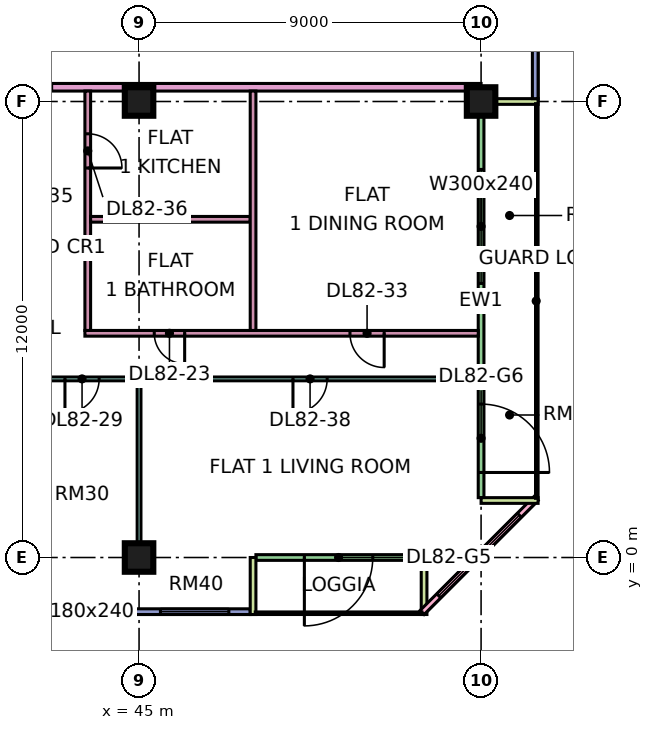
"""IFC4 building model, lengths in metres.
Left out: names, types, materials, properties, quantities, classifications, styles, units other than length and angle.
Written with IfcOpenShell. Run it as: python <this file> out.ifc"""

import sys

from ifc_helpers import new_model, si_unit, direction, frame, frame_2d, origin, origin_2d, place, context, subcontext, project, spatial, rectangle, extrude, element, fill, save


model = new_model("IFC4")
c1 = context("Model", 3, precision=1e-05, world=origin(), true_north=direction((0.0, 1.0)))
c2 = subcontext(c1, "Body", "Model", "MODEL_VIEW")
j1 = project(units=[si_unit("LENGTHUNIT", "METRE"), si_unit("PLANEANGLEUNIT", "RADIAN")], contexts=[c1])
p1 = place(None, origin())
s1 = spatial("IfcSite", under=j1, at=p1, CompositionType="ELEMENT")
p2 = place(p1, origin())
s2 = spatial("IfcBuilding", under=s1, at=p2, CompositionType="ELEMENT")
p3 = place(p2, frame((0.0, 0.0, 353.9)))
s3 = spatial("IfcBuildingStorey", under=s2, at=p3, CompositionType="ELEMENT", Elevation=353.9)
for number, where, z_axis, x_axis in (
    (1, (45.0, 0.0, 0.0), (0.0, 0.0, 1.0), (1.0, 0.0, 0.0)),
    (2, (45.0, 12.0, 0.0), (0.0, 0.0, 1.0), (1.0, 0.0, 0.0)),
    (3, (54.0, 12.0, 0.0), (0.0, 0.0, 1.0), (1.0, 0.0, 0.0)),
):
    element("IfcColumn", number, at=place(p3, frame(where, z_axis=z_axis, x_axis=x_axis)), inside=s3, PredefinedType="COLUMN", context=c2, shape_type="SweptSolid", body=[
        extrude(rectangle(XDim=0.75, YDim=0.75, at=origin_2d()), origin(), (0.0, 0.0, 1.0), 3.75),
    ])
p4 = place(p3, frame((36.075, -1.425, 0.0), z_axis=(0.0, 0.0, 1.0), x_axis=(1.0, 0.0, 0.0)))
e4 = element("IfcWall", 4, at=p4, inside=s3, PredefinedType="SOLIDWALL", context=c2, shape_type="SweptSolid", body=[
    extrude(rectangle(XDim=11.85, YDim=0.15, at=frame_2d((5.925, 0.0))), origin(), (0.0, 0.0, 1.0), 3.35),
])
p5 = place(p4, frame((0.562, 0.0, 0.45)))
e5 = element("IfcOpeningElement", 5, at=p5, cuts=e4, PredefinedType="OPENING", context=c2, shape_type="SweptSolid", body=[
    extrude(rectangle(XDim=1.8, YDim=2.4, at=frame_2d((0.9, 1.2))), frame((0.0, 0.085, 0.0), z_axis=(0.0, -1.0, 0.0), x_axis=(1.0, 0.0, 0.0)), (0.0, 0.0, 1.0), 0.17),
])
p6 = place(p4, frame((3.525, 0.0, 0.45)))
e6 = element("IfcOpeningElement", 6, at=p6, cuts=e4, PredefinedType="OPENING", context=c2, shape_type="SweptSolid", body=[
    extrude(rectangle(XDim=1.8, YDim=2.4, at=frame_2d((0.9, 1.2))), frame((0.0, 0.085, 0.0), z_axis=(0.0, -1.0, 0.0), x_axis=(1.0, 0.0, 0.0)), (0.0, 0.0, 1.0), 0.17),
])
p7 = place(p4, frame((6.525, 0.0, 0.45)))
e7 = element("IfcOpeningElement", 7, at=p7, cuts=e4, PredefinedType="OPENING", context=c2, shape_type="SweptSolid", body=[
    extrude(rectangle(XDim=1.8, YDim=2.4, at=frame_2d((0.9, 1.2))), frame((0.0, 0.085, 0.0), z_axis=(0.0, -1.0, 0.0), x_axis=(1.0, 0.0, 0.0)), (0.0, 0.0, 1.0), 0.17),
])
p8 = place(p4, frame((9.488, 0.0, 0.45)))
e8 = element("IfcOpeningElement", 8, at=p8, cuts=e4, PredefinedType="OPENING", context=c2, shape_type="SweptSolid", body=[
    extrude(rectangle(XDim=1.8, YDim=2.4, at=frame_2d((0.9, 1.2))), frame((0.0, 0.085, 0.0), z_axis=(0.0, -1.0, 0.0), x_axis=(1.0, 0.0, 0.0)), (0.0, 0.0, 1.0), 0.17),
])
p9 = place(p3, frame((48.075, 0.0, 0.0), z_axis=(0.0, 0.0, 1.0), x_axis=(1.0, 0.0, 0.0)))
e9 = element("IfcWall", 9, at=p9, inside=s3, PredefinedType="SOLIDWALL", context=c2, shape_type="SweptSolid", body=[
    extrude(rectangle(XDim=4.35, YDim=0.15, at=frame_2d((2.175, 0.0))), origin(), (0.0, 0.0, 1.0), 3.35),
])
p10 = place(p9, frame((1.275, 0.0, 0.0)))
e10 = element("IfcOpeningElement", 10, at=p10, cuts=e9, PredefinedType="OPENING", context=c2, shape_type="SweptSolid", body=[
    extrude(rectangle(XDim=1.8, YDim=2.4, at=frame_2d((0.9, 1.2))), frame((0.0, 0.085, 0.0), z_axis=(0.0, -1.0, 0.0), x_axis=(1.0, 0.0, 0.0)), (0.0, 0.0, 1.0), 0.17),
])
for number, where, z_axis, x_axis in (
    (11, (48.0, -1.5, 0.0), (0.0, 0.0, 1.0), (0.0, 1.0, 0.0)),
    (12, (52.5, -1.5, 0.0), (0.0, 0.0, 1.0), (0.0, 1.0, 0.0)),
):
    element("IfcWall", number, at=place(p3, frame(where, z_axis=z_axis, x_axis=x_axis)), inside=s3, PredefinedType="SOLIDWALL", context=c2, shape_type="SweptSolid", body=[
        extrude(rectangle(XDim=1.5, YDim=0.15, at=frame_2d((0.75, 0.0))), origin(), (0.0, 0.0, 1.0), 3.35),
    ])
p11 = place(p3, frame((52.447, -1.447, 0.0), z_axis=(0.0, 0.0, 1.0), x_axis=(0.707106781187, 0.707106781187, 0.0)))
e13 = element("IfcWall", 13, at=p11, inside=s3, PredefinedType="SOLIDWALL", context=c2, shape_type="SweptSolid", body=[
    extrude(rectangle(XDim=4.243, YDim=0.15, at=frame_2d((2.121, 0.0))), origin(), (0.0, 0.0, 1.0), 3.35),
])
p12 = place(p11, frame((0.621, 0.0, 0.45)))
e14 = element("IfcOpeningElement", 14, at=p12, cuts=e13, PredefinedType="OPENING", context=c2, shape_type="SweptSolid", body=[
    extrude(rectangle(XDim=3.0, YDim=2.4, at=frame_2d((1.5, 1.2))), frame((0.0, 0.085, 0.0), z_axis=(0.0, -1.0, 0.0), x_axis=(1.0, 0.0, 0.0)), (0.0, 0.0, 1.0), 0.17),
])
p13 = place(p3, frame((54.0, 1.575, 0.0), z_axis=(0.0, 0.0, 1.0), x_axis=(0.0, 1.0, 0.0)))
e15 = element("IfcWall", 15, at=p13, inside=s3, PredefinedType="SOLIDWALL", context=c2, shape_type="SweptSolid", body=[
    extrude(rectangle(XDim=10.35, YDim=0.15, at=frame_2d((5.175, 0.0))), origin(), (0.0, 0.0, 1.0), 3.35),
])
p14 = place(p13, frame((0.663, 0.0, 0.0)))
e16 = element("IfcOpeningElement", 16, at=p14, cuts=e15, PredefinedType="OPENING", context=c2, shape_type="SweptSolid", body=[
    extrude(rectangle(XDim=1.8, YDim=2.4, at=frame_2d((0.9, 1.2))), frame((0.0, 0.085, 0.0), z_axis=(0.0, -1.0, 0.0), x_axis=(1.0, 0.0, 0.0)), (0.0, 0.0, 1.0), 0.17),
])
p15 = place(p13, frame((5.637, 0.0, 0.45)))
e17 = element("IfcOpeningElement", 17, at=p15, cuts=e15, PredefinedType="OPENING", context=c2, shape_type="SweptSolid", body=[
    extrude(rectangle(XDim=3.0, YDim=2.4, at=frame_2d((1.5, 1.2))), frame((0.0, 0.085, 0.0), z_axis=(0.0, -1.0, 0.0), x_axis=(1.0, 0.0, 0.0)), (0.0, 0.0, 1.0), 0.17),
])
for number, where, z_axis, x_axis in (
    (18, (55.5, 1.5, 0.0), (0.0, 0.0, 1.0), (-1.0, 0.0, 0.0)),
    (19, (55.5, 12.0, 0.0), (0.0, 0.0, 1.0), (-1.0, 0.0, 0.0)),
):
    element("IfcWall", number, at=place(p3, frame(where, z_axis=z_axis, x_axis=x_axis)), inside=s3, PredefinedType="SOLIDWALL", context=c2, shape_type="SweptSolid", body=[
        extrude(rectangle(XDim=1.5, YDim=0.15, at=frame_2d((0.75, 0.0))), origin(), (0.0, 0.0, 1.0), 3.35),
    ])
p16 = place(p3, frame((55.425, 12.075, 0.0), z_axis=(0.0, 0.0, 1.0), x_axis=(0.0, 1.0, 0.0)))
e20 = element("IfcWall", 20, at=p16, inside=s3, PredefinedType="SOLIDWALL", context=c2, shape_type="SweptSolid", body=[
    extrude(rectangle(XDim=10.425, YDim=0.15, at=frame_2d((5.212, 0.0))), origin(), (0.0, 0.0, 1.0), 3.35),
])
p17 = place(p16, frame((4.575, 0.0, 0.45)))
e21 = element("IfcOpeningElement", 21, at=p17, cuts=e20, PredefinedType="OPENING", context=c2, shape_type="SweptSolid", body=[
    extrude(rectangle(XDim=4.8, YDim=2.4, at=frame_2d((2.4, 1.2))), frame((0.0, 0.085, 0.0), z_axis=(0.0, -1.0, 0.0), x_axis=(1.0, 0.0, 0.0)), (0.0, 0.0, 1.0), 0.17),
])
p18 = place(p3, frame((33.05, 4.7, 0.0), z_axis=(0.0, 0.0, 1.0), x_axis=(1.0, 0.0, 0.0)))
e22 = element("IfcWall", 22, at=p18, inside=s3, PredefinedType="PARTITIONING", context=c2, shape_type="SweptSolid", body=[
    extrude(rectangle(XDim=20.876, YDim=0.1, at=frame_2d((10.438, 0.0))), origin(), (0.0, 0.0, 1.0), 3.35),
])
p19 = place(p18, frame((1.0, 0.0, 0.0)))
e23 = element("IfcOpeningElement", 23, at=p19, cuts=e22, PredefinedType="OPENING", context=c2, shape_type="SweptSolid", body=[
    extrude(rectangle(XDim=0.9, YDim=2.1, at=frame_2d((0.45, 1.05))), frame((0.0, 0.06, 0.0), z_axis=(0.0, -1.0, 0.0), x_axis=(1.0, 0.0, 0.0)), (0.0, 0.0, 1.0), 0.12),
])
p20 = place(p18, frame((4.0, 0.0, 0.0)))
e24 = element("IfcOpeningElement", 24, at=p20, cuts=e22, PredefinedType="OPENING", context=c2, shape_type="SweptSolid", body=[
    extrude(rectangle(XDim=0.9, YDim=2.1, at=frame_2d((0.45, 1.05))), frame((0.0, 0.06, 0.0), z_axis=(0.0, -1.0, 0.0), x_axis=(1.0, 0.0, 0.0)), (0.0, 0.0, 1.0), 0.12),
])
p21 = place(p18, frame((7.0, 0.0, 0.0)))
e25 = element("IfcOpeningElement", 25, at=p21, cuts=e22, PredefinedType="OPENING", context=c2, shape_type="SweptSolid", body=[
    extrude(rectangle(XDim=0.9, YDim=2.1, at=frame_2d((0.45, 1.05))), frame((0.0, 0.06, 0.0), z_axis=(0.0, -1.0, 0.0), x_axis=(1.0, 0.0, 0.0)), (0.0, 0.0, 1.0), 0.12),
])
p22 = place(p18, frame((10.0, 0.0, 0.0)))
e26 = element("IfcOpeningElement", 26, at=p22, cuts=e22, PredefinedType="OPENING", context=c2, shape_type="SweptSolid", body=[
    extrude(rectangle(XDim=0.9, YDim=2.1, at=frame_2d((0.45, 1.05))), frame((0.0, 0.06, 0.0), z_axis=(0.0, -1.0, 0.0), x_axis=(1.0, 0.0, 0.0)), (0.0, 0.0, 1.0), 0.12),
])
p23 = place(p18, frame((16.0, 0.0, 0.0)))
e27 = element("IfcOpeningElement", 27, at=p23, cuts=e22, PredefinedType="OPENING", context=c2, shape_type="SweptSolid", body=[
    extrude(rectangle(XDim=0.9, YDim=2.1, at=frame_2d((0.45, 1.05))), frame((0.0, 0.06, 0.0), z_axis=(0.0, -1.0, 0.0), x_axis=(1.0, 0.0, 0.0)), (0.0, 0.0, 1.0), 0.12),
])
p24 = place(p3, frame((40.65, 12.375, 0.0), z_axis=(0.0, 0.0, 1.0), x_axis=(1.0, 0.0, 0.0)))
e28 = element("IfcWall", 28, at=p24, inside=s3, PredefinedType="PARTITIONING", context=c2, shape_type="SweptSolid", body=[
    extrude(rectangle(XDim=13.35, YDim=0.2, at=frame_2d((6.675, 0.0))), origin(), (0.0, 0.0, 1.0), 3.35),
])
p25 = place(p24, frame((1.05, 0.0, 0.0)))
e29 = element("IfcOpeningElement", 29, at=p25, cuts=e28, PredefinedType="OPENING", context=c2, shape_type="SweptSolid", body=[
    extrude(rectangle(XDim=1.0, YDim=2.1, at=frame_2d((0.5, 1.05))), frame((0.0, 0.11, 0.0), z_axis=(0.0, -1.0, 0.0), x_axis=(1.0, 0.0, 0.0)), (0.0, 0.0, 1.0), 0.22),
])
p26 = place(p3, frame((43.575, 5.9, 0.0), z_axis=(0.0, 0.0, 1.0), x_axis=(1.0, 0.0, 0.0)))
e30 = element("IfcWall", 30, at=p26, inside=s3, PredefinedType="PARTITIONING", context=c2, shape_type="SweptSolid", body=[
    extrude(rectangle(XDim=10.351, YDim=0.15, at=frame_2d((5.176, 0.0))), origin(), (0.0, 0.0, 1.0), 3.35),
])
p27 = place(p26, frame((1.825, 0.0, 0.0)))
e31 = element("IfcOpeningElement", 31, at=p27, cuts=e30, PredefinedType="OPENING", context=c2, shape_type="SweptSolid", body=[
    extrude(rectangle(XDim=0.8, YDim=2.1, at=frame_2d((0.4, 1.05))), frame((0.0, 0.085, 0.0), z_axis=(0.0, -1.0, 0.0), x_axis=(1.0, 0.0, 0.0)), (0.0, 0.0, 1.0), 0.17),
])
p28 = place(p26, frame((6.975, 0.0, 0.0)))
e32 = element("IfcOpeningElement", 32, at=p28, cuts=e30, PredefinedType="OPENING", context=c2, shape_type="SweptSolid", body=[
    extrude(rectangle(XDim=0.9, YDim=2.1, at=frame_2d((0.45, 1.05))), frame((0.0, 0.085, 0.0), z_axis=(0.0, -1.0, 0.0), x_axis=(1.0, 0.0, 0.0)), (0.0, 0.0, 1.0), 0.17),
])
p29 = place(p3, frame((43.65, 5.975, 0.0), z_axis=(0.0, 0.0, 1.0), x_axis=(0.0, 1.0, 0.0)))
e33 = element("IfcWall", 33, at=p29, inside=s3, PredefinedType="PARTITIONING", context=c2, shape_type="SweptSolid", body=[
    extrude(rectangle(XDim=6.3, YDim=0.15, at=frame_2d((3.15, 0.0))), origin(), (0.0, 0.0, 1.0), 3.35),
])
p30 = place(p29, frame((4.275, 0.0, 0.0)))
e34 = element("IfcOpeningElement", 34, at=p30, cuts=e33, PredefinedType="OPENING", context=c2, shape_type="SweptSolid", body=[
    extrude(rectangle(XDim=0.9, YDim=2.1, at=frame_2d((0.45, 1.05))), frame((0.0, 0.085, 0.0), z_axis=(0.0, -1.0, 0.0), x_axis=(1.0, 0.0, 0.0)), (0.0, 0.0, 1.0), 0.17),
])
p31 = place(p3, frame((43.725, 8.9, 0.0), z_axis=(0.0, 0.0, 1.0), x_axis=(1.0, 0.0, 0.0)))
e35 = element("IfcWall", 35, at=p31, inside=s3, PredefinedType="PARTITIONING", context=c2, shape_type="SweptSolid", body=[
    extrude(rectangle(XDim=4.2, YDim=0.15, at=frame_2d((2.1, 0.0))), origin(), (0.0, 0.0, 1.0), 3.35),
])
p32 = place(p3, frame((45.0, 0.0, 0.0), z_axis=(0.0, 0.0, 1.0), x_axis=(0.0, 1.0, 0.0)))
e36 = element("IfcWall", 36, at=p32, inside=s3, PredefinedType="PARTITIONING", context=c2, shape_type="SweptSolid", body=[
    extrude(rectangle(XDim=4.65, YDim=0.1, at=frame_2d((2.325, 0.0))), origin(), (0.0, 0.0, 1.0), 3.35),
])
p33 = place(p3, frame((48.0, 5.975, 0.0), z_axis=(0.0, 0.0, 1.0), x_axis=(0.0, 1.0, 0.0)))
e37 = element("IfcWall", 37, at=p33, inside=s3, PredefinedType="PARTITIONING", context=c2, shape_type="SweptSolid", body=[
    extrude(rectangle(XDim=6.3, YDim=0.15, at=frame_2d((3.15, 0.0))), origin(), (0.0, 0.0, 1.0), 3.35),
])
p34 = place(p7, origin())
e38 = element("IfcWindow", 38, at=p34, inside=s3, PartitioningType="SINGLE_PANEL", PredefinedType="WINDOW", context=c2, shape_type="SweptSolid", body=[
    extrude(rectangle(XDim=1.8, YDim=2.4, at=frame_2d((0.9, 1.2))), frame((0.0, 0.03, 0.0), z_axis=(0.0, -1.0, 0.0), x_axis=(1.0, 0.0, 0.0)), (0.0, 0.0, 1.0), 0.06),
])
fill(e7, e38)
p35 = place(p8, origin())
e39 = element("IfcWindow", 39, at=p35, inside=s3, PartitioningType="SINGLE_PANEL", PredefinedType="WINDOW", context=c2, shape_type="SweptSolid", body=[
    extrude(rectangle(XDim=1.8, YDim=2.4, at=frame_2d((0.9, 1.2))), frame((0.0, 0.03, 0.0), z_axis=(0.0, -1.0, 0.0), x_axis=(1.0, 0.0, 0.0)), (0.0, 0.0, 1.0), 0.06),
])
fill(e8, e39)
p36 = place(p10, frame((1.8, 0.0, 0.0), z_axis=(0.0, 0.0, 1.0), x_axis=(-1.0, 0.0, 0.0)))
e40 = element("IfcDoor", 40, at=p36, inside=s3, OperationType="DOUBLE_DOOR_SINGLE_SWING", PredefinedType="DOOR", context=c2, shape_type="SweptSolid", body=[
    extrude(rectangle(XDim=1.8, YDim=2.4, at=frame_2d((0.9, 1.2))), frame((0.0, 0.025, 0.0), z_axis=(0.0, -1.0, 0.0), x_axis=(1.0, 0.0, 0.0)), (0.0, 0.0, 1.0), 0.05),
])
fill(e10, e40)
p37 = place(p12, origin())
e41 = element("IfcWindow", 41, at=p37, inside=s3, PartitioningType="SINGLE_PANEL", PredefinedType="WINDOW", context=c2, shape_type="SweptSolid", body=[
    extrude(rectangle(XDim=3.0, YDim=2.4, at=frame_2d((1.5, 1.2))), frame((0.0, 0.03, 0.0), z_axis=(0.0, -1.0, 0.0), x_axis=(1.0, 0.0, 0.0)), (0.0, 0.0, 1.0), 0.06),
])
fill(e14, e41)
p38 = place(p14, frame((1.8, 0.0, 0.0), z_axis=(0.0, 0.0, 1.0), x_axis=(-1.0, 0.0, 0.0)))
e42 = element("IfcDoor", 42, at=p38, inside=s3, OperationType="DOUBLE_DOOR_SINGLE_SWING", PredefinedType="DOOR", context=c2, shape_type="SweptSolid", body=[
    extrude(rectangle(XDim=1.8, YDim=2.4, at=frame_2d((0.9, 1.2))), frame((0.0, 0.025, 0.0), z_axis=(0.0, -1.0, 0.0), x_axis=(1.0, 0.0, 0.0)), (0.0, 0.0, 1.0), 0.05),
])
fill(e16, e42)
p39 = place(p15, origin())
e43 = element("IfcWindow", 43, at=p39, inside=s3, PartitioningType="SINGLE_PANEL", PredefinedType="WINDOW", context=c2, shape_type="SweptSolid", body=[
    extrude(rectangle(XDim=3.0, YDim=2.4, at=frame_2d((1.5, 1.2))), frame((0.0, 0.03, 0.0), z_axis=(0.0, -1.0, 0.0), x_axis=(1.0, 0.0, 0.0)), (0.0, 0.0, 1.0), 0.06),
])
fill(e17, e43)
p40 = place(p27, origin())
e44 = element("IfcDoor", 44, at=p40, inside=s3, OperationType="SINGLE_SWING_RIGHT", PredefinedType="DOOR", context=c2, shape_type="SweptSolid", body=[
    extrude(rectangle(XDim=0.8, YDim=2.1, at=frame_2d((0.4, 1.05))), frame((0.0, 0.025, 0.0), z_axis=(0.0, -1.0, 0.0), x_axis=(1.0, 0.0, 0.0)), (0.0, 0.0, 1.0), 0.05),
])
fill(e31, e44)
p41 = place(p22, frame((0.9, 0.0, 0.0), z_axis=(0.0, 0.0, 1.0), x_axis=(-1.0, 0.0, 0.0)))
e45 = element("IfcDoor", 45, at=p41, inside=s3, OperationType="SINGLE_SWING_LEFT", PredefinedType="DOOR", context=c2, shape_type="SweptSolid", body=[
    extrude(rectangle(XDim=0.9, YDim=2.1, at=frame_2d((0.45, 1.05))), frame((0.0, 0.025, 0.0), z_axis=(0.0, -1.0, 0.0), x_axis=(1.0, 0.0, 0.0)), (0.0, 0.0, 1.0), 0.05),
])
fill(e26, e45)
p42 = place(p28, origin())
e46 = element("IfcDoor", 46, at=p42, inside=s3, OperationType="SINGLE_SWING_RIGHT", PredefinedType="DOOR", context=c2, shape_type="SweptSolid", body=[
    extrude(rectangle(XDim=0.9, YDim=2.1, at=frame_2d((0.45, 1.05))), frame((0.0, 0.025, 0.0), z_axis=(0.0, -1.0, 0.0), x_axis=(1.0, 0.0, 0.0)), (0.0, 0.0, 1.0), 0.05),
])
fill(e32, e46)
p43 = place(p30, frame((0.9, 0.0, 0.0), z_axis=(0.0, 0.0, 1.0), x_axis=(-1.0, 0.0, 0.0)))
e47 = element("IfcDoor", 47, at=p43, inside=s3, OperationType="SINGLE_SWING_LEFT", PredefinedType="DOOR", context=c2, shape_type="SweptSolid", body=[
    extrude(rectangle(XDim=0.9, YDim=2.1, at=frame_2d((0.45, 1.05))), frame((0.0, 0.025, 0.0), z_axis=(0.0, -1.0, 0.0), x_axis=(1.0, 0.0, 0.0)), (0.0, 0.0, 1.0), 0.05),
])
fill(e34, e47)
p44 = place(p23, frame((0.9, 0.0, 0.0), z_axis=(0.0, 0.0, 1.0), x_axis=(-1.0, 0.0, 0.0)))
e48 = element("IfcDoor", 48, at=p44, inside=s3, OperationType="SINGLE_SWING_LEFT", PredefinedType="DOOR", context=c2, shape_type="SweptSolid", body=[
    extrude(rectangle(XDim=0.9, YDim=2.1, at=frame_2d((0.45, 1.05))), frame((0.0, 0.025, 0.0), z_axis=(0.0, -1.0, 0.0), x_axis=(1.0, 0.0, 0.0)), (0.0, 0.0, 1.0), 0.05),
])
fill(e27, e48)
save(model, sys.argv[1])
